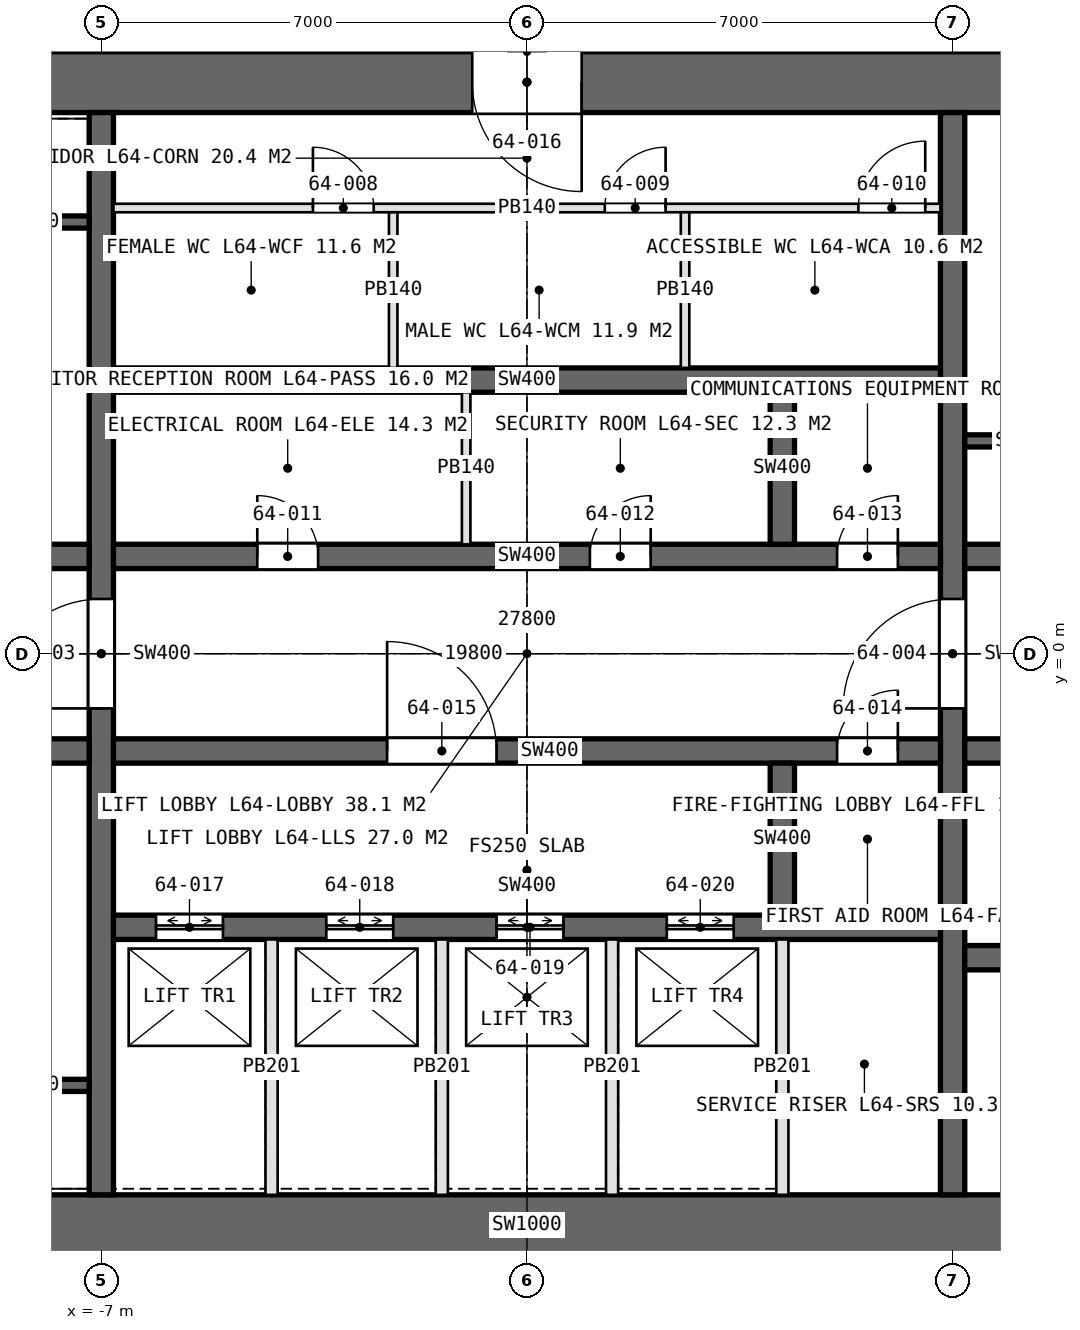
"""IFC4 building model, lengths in metres.
Left out: names, types, materials, properties, quantities, classifications, styles, units other than length and angle.
Written with IfcOpenShell. Run it as: python <this file> out.ifc"""

import sys

from ifc_helpers import new_model, si_unit, direction, frame, frame_2d, origin, place, context, subcontext, project, spatial, rectangle, extrude, element, fill, save


model = new_model("IFC4")
c1 = context("Model", 3, precision=1e-05, world=origin(), true_north=direction((0.0, 1.0)))
c2 = subcontext(c1, "Body", "Model", "MODEL_VIEW")
j1 = project(units=[si_unit("LENGTHUNIT", "METRE"), si_unit("PLANEANGLEUNIT", "RADIAN")], contexts=[c1])
p1 = place(None, origin())
s1 = spatial("IfcSite", under=j1, at=p1, CompositionType="ELEMENT")
p2 = place(p1, origin())
s2 = spatial("IfcBuilding", under=s1, at=p2, CompositionType="ELEMENT")
p3 = place(p2, frame((0.0, 0.0, 288.0)))
s3 = spatial("IfcBuildingStorey", under=s2, at=p3, CompositionType="ELEMENT", Elevation=288.0)
p4 = place(p3, frame((-13.9, -9.4, 0.0), z_axis=(0.0, 0.0, 1.0), x_axis=(1.0, 0.0, 0.0)))
e1 = element("IfcWall", 1, at=p4, inside=s3, PredefinedType="SHEAR", context=c2, shape_type="SweptSolid", body=[
    extrude(rectangle(XDim=27.8, YDim=1.0, at=frame_2d((13.9, 0.0))), origin(), (0.0, 0.0, 1.0), 4.2),
])
p5 = place(p4, frame((22.95, 0.0, 0.0)))
e2 = element("IfcOpeningElement", 2, at=p5, cuts=e1, PredefinedType="OPENING", context=c2, shape_type="SweptSolid", body=[
    extrude(rectangle(XDim=2.2, YDim=2.7, at=frame_2d((1.1, 1.35))), frame((0.0, 0.51, 0.0), z_axis=(0.0, -1.0, 0.0), x_axis=(1.0, 0.0, 0.0)), (0.0, 0.0, 1.0), 1.02),
])
p6 = place(p3, frame((13.9, 9.4, 0.0), z_axis=(0.0, 0.0, 1.0), x_axis=(-1.0, 0.0, 0.0)))
e3 = element("IfcWall", 3, at=p6, inside=s3, PredefinedType="SHEAR", context=c2, shape_type="SweptSolid", body=[
    extrude(rectangle(XDim=27.8, YDim=1.0, at=frame_2d((13.9, 0.0))), origin(), (0.0, 0.0, 1.0), 4.2),
])
p7 = place(p6, frame((23.9, 0.0, 0.0)))
e4 = element("IfcOpeningElement", 4, at=p7, cuts=e3, PredefinedType="OPENING", context=c2, shape_type="SweptSolid", body=[
    extrude(rectangle(XDim=1.0, YDim=2.4, at=frame_2d((0.5, 1.2))), frame((0.0, 0.51, 0.0), z_axis=(0.0, -1.0, 0.0), x_axis=(1.0, 0.0, 0.0)), (0.0, 0.0, 1.0), 1.02),
])
p8 = place(p6, frame((13.0, 0.0, 0.0)))
e5 = element("IfcOpeningElement", 5, at=p8, cuts=e3, PredefinedType="OPENING", context=c2, shape_type="SweptSolid", body=[
    extrude(rectangle(XDim=1.8, YDim=2.4, at=frame_2d((0.9, 1.2))), frame((0.0, 0.51, 0.0), z_axis=(0.0, -1.0, 0.0), x_axis=(1.0, 0.0, 0.0)), (0.0, 0.0, 1.0), 1.02),
])
p9 = place(p3, frame((-7.0, -8.9, 0.0), z_axis=(0.0, 0.0, 1.0), x_axis=(0.0, 1.0, 0.0)))
e6 = element("IfcWall", 6, at=p9, inside=s3, PredefinedType="SHEAR", context=c2, shape_type="SweptSolid", body=[
    extrude(rectangle(XDim=17.8, YDim=0.4, at=frame_2d((8.9, 0.0))), origin(), (0.0, 0.0, 1.0), 4.2),
])
p10 = place(p9, frame((8.0, 0.0, 0.0)))
e7 = element("IfcOpeningElement", 7, at=p10, cuts=e6, PredefinedType="OPENING", context=c2, shape_type="SweptSolid", body=[
    extrude(rectangle(XDim=1.8, YDim=2.4, at=frame_2d((0.9, 1.2))), frame((0.0, 0.21, 0.0), z_axis=(0.0, -1.0, 0.0), x_axis=(1.0, 0.0, 0.0)), (0.0, 0.0, 1.0), 0.42),
])
p11 = place(p3, frame((7.0, -8.9, 0.0), z_axis=(0.0, 0.0, 1.0), x_axis=(0.0, 1.0, 0.0)))
e8 = element("IfcWall", 8, at=p11, inside=s3, PredefinedType="SHEAR", context=c2, shape_type="SweptSolid", body=[
    extrude(rectangle(XDim=17.8, YDim=0.4, at=frame_2d((8.9, 0.0))), origin(), (0.0, 0.0, 1.0), 4.2),
])
p12 = place(p11, frame((8.0, 0.0, 0.0)))
e9 = element("IfcOpeningElement", 9, at=p12, cuts=e8, PredefinedType="OPENING", context=c2, shape_type="SweptSolid", body=[
    extrude(rectangle(XDim=1.8, YDim=2.4, at=frame_2d((0.9, 1.2))), frame((0.0, 0.21, 0.0), z_axis=(0.0, -1.0, 0.0), x_axis=(1.0, 0.0, 0.0)), (0.0, 0.0, 1.0), 0.42),
])
p13 = place(p3, frame((-6.8, 1.6, 0.0), z_axis=(0.0, 0.0, 1.0), x_axis=(1.0, 0.0, 0.0)))
e10 = element("IfcWall", 10, at=p13, inside=s3, PredefinedType="SHEAR", context=c2, shape_type="SweptSolid", body=[
    extrude(rectangle(XDim=13.6, YDim=0.4, at=frame_2d((6.8, 0.0))), origin(), (0.0, 0.0, 1.0), 4.2),
])
p14 = place(p13, frame((2.365, 0.0, 0.0)))
e11 = element("IfcOpeningElement", 11, at=p14, cuts=e10, PredefinedType="OPENING", context=c2, shape_type="SweptSolid", body=[
    extrude(rectangle(XDim=1.0, YDim=2.4, at=frame_2d((0.5, 1.2))), frame((0.0, 0.21, 0.0), z_axis=(0.0, -1.0, 0.0), x_axis=(1.0, 0.0, 0.0)), (0.0, 0.0, 1.0), 0.42),
])
p15 = place(p13, frame((7.835, 0.0, 0.0)))
e12 = element("IfcOpeningElement", 12, at=p15, cuts=e10, PredefinedType="OPENING", context=c2, shape_type="SweptSolid", body=[
    extrude(rectangle(XDim=1.0, YDim=2.4, at=frame_2d((0.5, 1.2))), frame((0.0, 0.21, 0.0), z_axis=(0.0, -1.0, 0.0), x_axis=(1.0, 0.0, 0.0)), (0.0, 0.0, 1.0), 0.42),
])
p16 = place(p13, frame((11.9, 0.0, 0.0)))
e13 = element("IfcOpeningElement", 13, at=p16, cuts=e10, PredefinedType="OPENING", context=c2, shape_type="SweptSolid", body=[
    extrude(rectangle(XDim=1.0, YDim=2.4, at=frame_2d((0.5, 1.2))), frame((0.0, 0.21, 0.0), z_axis=(0.0, -1.0, 0.0), x_axis=(1.0, 0.0, 0.0)), (0.0, 0.0, 1.0), 0.42),
])
p17 = place(p3, frame((-6.8, -1.6, 0.0), z_axis=(0.0, 0.0, 1.0), x_axis=(1.0, 0.0, 0.0)))
e14 = element("IfcWall", 14, at=p17, inside=s3, PredefinedType="SHEAR", context=c2, shape_type="SweptSolid", body=[
    extrude(rectangle(XDim=13.6, YDim=0.4, at=frame_2d((6.8, 0.0))), origin(), (0.0, 0.0, 1.0), 4.2),
])
p18 = place(p17, frame((11.9, 0.0, 0.0)))
e15 = element("IfcOpeningElement", 15, at=p18, cuts=e14, PredefinedType="OPENING", context=c2, shape_type="SweptSolid", body=[
    extrude(rectangle(XDim=1.0, YDim=2.4, at=frame_2d((0.5, 1.2))), frame((0.0, 0.21, 0.0), z_axis=(0.0, -1.0, 0.0), x_axis=(1.0, 0.0, 0.0)), (0.0, 0.0, 1.0), 0.42),
])
p19 = place(p17, frame((4.5, 0.0, 0.0)))
e16 = element("IfcOpeningElement", 16, at=p19, cuts=e14, PredefinedType="OPENING", context=c2, shape_type="SweptSolid", body=[
    extrude(rectangle(XDim=1.8, YDim=2.4, at=frame_2d((0.9, 1.2))), frame((0.0, 0.21, 0.0), z_axis=(0.0, -1.0, 0.0), x_axis=(1.0, 0.0, 0.0)), (0.0, 0.0, 1.0), 0.42),
])
p20 = place(p3, frame((-6.8, 4.5, 0.0), z_axis=(0.0, 0.0, 1.0), x_axis=(1.0, 0.0, 0.0)))
e17 = element("IfcWall", 17, at=p20, inside=s3, PredefinedType="SHEAR", context=c2, shape_type="SweptSolid", body=[
    extrude(rectangle(XDim=13.6, YDim=0.4, at=frame_2d((6.8, 0.0))), origin(), (0.0, 0.0, 1.0), 4.2),
])
p21 = place(p3, frame((-6.8, -4.5, 0.0), z_axis=(0.0, 0.0, 1.0), x_axis=(1.0, 0.0, 0.0)))
e18 = element("IfcWall", 18, at=p21, inside=s3, PredefinedType="SHEAR", context=c2, shape_type="SweptSolid", body=[
    extrude(rectangle(XDim=13.6, YDim=0.4, at=frame_2d((6.8, 0.0))), origin(), (0.0, 0.0, 1.0), 4.2),
])
p22 = place(p21, frame((0.7, 0.0, 0.0)))
e19 = element("IfcOpeningElement", 19, at=p22, cuts=e18, PredefinedType="OPENING", context=c2, shape_type="SweptSolid", body=[
    extrude(rectangle(XDim=1.1, YDim=2.4, at=frame_2d((0.55, 1.2))), frame((0.0, 0.21, 0.0), z_axis=(0.0, -1.0, 0.0), x_axis=(1.0, 0.0, 0.0)), (0.0, 0.0, 1.0), 0.42),
])
p23 = place(p21, frame((3.5, 0.0, 0.0)))
e20 = element("IfcOpeningElement", 20, at=p23, cuts=e18, PredefinedType="OPENING", context=c2, shape_type="SweptSolid", body=[
    extrude(rectangle(XDim=1.1, YDim=2.4, at=frame_2d((0.55, 1.2))), frame((0.0, 0.21, 0.0), z_axis=(0.0, -1.0, 0.0), x_axis=(1.0, 0.0, 0.0)), (0.0, 0.0, 1.0), 0.42),
])
p24 = place(p21, frame((6.3, 0.0, 0.0)))
e21 = element("IfcOpeningElement", 21, at=p24, cuts=e18, PredefinedType="OPENING", context=c2, shape_type="SweptSolid", body=[
    extrude(rectangle(XDim=1.1, YDim=2.4, at=frame_2d((0.55, 1.2))), frame((0.0, 0.21, 0.0), z_axis=(0.0, -1.0, 0.0), x_axis=(1.0, 0.0, 0.0)), (0.0, 0.0, 1.0), 0.42),
])
p25 = place(p21, frame((9.1, 0.0, 0.0)))
e22 = element("IfcOpeningElement", 22, at=p25, cuts=e18, PredefinedType="OPENING", context=c2, shape_type="SweptSolid", body=[
    extrude(rectangle(XDim=1.1, YDim=2.4, at=frame_2d((0.55, 1.2))), frame((0.0, 0.21, 0.0), z_axis=(0.0, -1.0, 0.0), x_axis=(1.0, 0.0, 0.0)), (0.0, 0.0, 1.0), 0.42),
])
for number, where, z_axis, x_axis in (
    (23, (-12.9, 1.6, 0.0), (0.0, 0.0, 1.0), (1.0, 0.0, 0.0)),
    (24, (-12.9, -1.6, 0.0), (0.0, 0.0, 1.0), (1.0, 0.0, 0.0)),
):
    element("IfcWall", number, at=place(p3, frame(where, z_axis=z_axis, x_axis=x_axis)), inside=s3, PredefinedType="SHEAR", context=c2, shape_type="SweptSolid", body=[
        extrude(rectangle(XDim=5.7, YDim=0.4, at=frame_2d((2.85, 0.0))), origin(), (0.0, 0.0, 1.0), 4.2),
    ])
p26 = place(p3, frame((7.2, 1.6, 0.0), z_axis=(0.0, 0.0, 1.0), x_axis=(1.0, 0.0, 0.0)))
e25 = element("IfcWall", 25, at=p26, inside=s3, PredefinedType="SHEAR", context=c2, shape_type="SweptSolid", body=[
    extrude(rectangle(XDim=5.7, YDim=0.4, at=frame_2d((2.85, 0.0))), origin(), (0.0, 0.0, 1.0), 4.2),
])
p27 = place(p26, frame((0.7, 0.0, 0.0)))
e26 = element("IfcOpeningElement", 26, at=p27, cuts=e25, PredefinedType="OPENING", context=c2, shape_type="SweptSolid", body=[
    extrude(rectangle(XDim=1.0, YDim=2.4, at=frame_2d((0.5, 1.2))), frame((0.0, 0.21, 0.0), z_axis=(0.0, -1.0, 0.0), x_axis=(1.0, 0.0, 0.0)), (0.0, 0.0, 1.0), 0.42),
])
p28 = place(p3, frame((7.2, -1.6, 0.0), z_axis=(0.0, 0.0, 1.0), x_axis=(1.0, 0.0, 0.0)))
e27 = element("IfcWall", 27, at=p28, inside=s3, PredefinedType="SHEAR", context=c2, shape_type="SweptSolid", body=[
    extrude(rectangle(XDim=5.7, YDim=0.4, at=frame_2d((2.85, 0.0))), origin(), (0.0, 0.0, 1.0), 4.2),
])
p29 = place(p28, frame((0.9, 0.0, 0.0)))
e28 = element("IfcOpeningElement", 28, at=p29, cuts=e27, PredefinedType="OPENING", context=c2, shape_type="SweptSolid", body=[
    extrude(rectangle(XDim=1.3, YDim=2.4, at=frame_2d((0.65, 1.2))), frame((0.0, 0.21, 0.0), z_axis=(0.0, -1.0, 0.0), x_axis=(1.0, 0.0, 0.0)), (0.0, 0.0, 1.0), 0.42),
])
p30 = place(p28, frame((3.95, 0.0, 0.0)))
e29 = element("IfcOpeningElement", 29, at=p30, cuts=e27, PredefinedType="OPENING", context=c2, shape_type="SweptSolid", body=[
    extrude(rectangle(XDim=1.3, YDim=2.4, at=frame_2d((0.65, 1.2))), frame((0.0, 0.21, 0.0), z_axis=(0.0, -1.0, 0.0), x_axis=(1.0, 0.0, 0.0)), (0.0, 0.0, 1.0), 0.42),
])
p31 = place(p3, frame((7.2, -5.0, 0.0), z_axis=(0.0, 0.0, 1.0), x_axis=(1.0, 0.0, 0.0)))
e30 = element("IfcWall", 30, at=p31, inside=s3, PredefinedType="SHEAR", context=c2, shape_type="SweptSolid", body=[
    extrude(rectangle(XDim=5.7, YDim=0.4, at=frame_2d((2.85, 0.0))), origin(), (0.0, 0.0, 1.0), 4.2),
])
for number, where, z_axis, x_axis in (
    (31, (4.2, 1.8, 0.0), (0.0, 0.0, 1.0), (0.0, 1.0, 0.0)),
    (32, (4.2, -4.3, 0.0), (0.0, 0.0, 1.0), (0.0, 1.0, 0.0)),
):
    element("IfcWall", number, at=place(p3, frame(where, z_axis=z_axis, x_axis=x_axis)), inside=s3, PredefinedType="SHEAR", context=c2, shape_type="SweptSolid", body=[
        extrude(rectangle(XDim=2.5, YDim=0.4, at=frame_2d((1.25, 0.0))), origin(), (0.0, 0.0, 1.0), 4.2),
    ])
p32 = place(p3, frame((-6.8, 7.33, 0.0), z_axis=(0.0, 0.0, 1.0), x_axis=(1.0, 0.0, 0.0)))
e33 = element("IfcWall", 33, at=p32, inside=s3, PredefinedType="PARTITIONING", context=c2, shape_type="SweptSolid", body=[
    extrude(rectangle(XDim=13.6, YDim=0.14, at=frame_2d((6.8, 0.0))), origin(), (0.0, 0.0, 1.0), 3.95),
])
p33 = place(p32, frame((3.28, 0.0, 0.0)))
e34 = element("IfcOpeningElement", 34, at=p33, cuts=e33, PredefinedType="OPENING", context=c2, shape_type="SweptSolid", body=[
    extrude(rectangle(XDim=1.0, YDim=2.4, at=frame_2d((0.5, 1.2))), frame((0.0, 0.08, 0.0), z_axis=(0.0, -1.0, 0.0), x_axis=(1.0, 0.0, 0.0)), (0.0, 0.0, 1.0), 0.16),
])
p34 = place(p32, frame((8.08, 0.0, 0.0)))
e35 = element("IfcOpeningElement", 35, at=p34, cuts=e33, PredefinedType="OPENING", context=c2, shape_type="SweptSolid", body=[
    extrude(rectangle(XDim=1.0, YDim=2.4, at=frame_2d((0.5, 1.2))), frame((0.0, 0.08, 0.0), z_axis=(0.0, -1.0, 0.0), x_axis=(1.0, 0.0, 0.0)), (0.0, 0.0, 1.0), 0.16),
])
p35 = place(p32, frame((12.25, 0.0, 0.0)))
e36 = element("IfcOpeningElement", 36, at=p35, cuts=e33, PredefinedType="OPENING", context=c2, shape_type="SweptSolid", body=[
    extrude(rectangle(XDim=1.1, YDim=2.4, at=frame_2d((0.55, 1.2))), frame((0.0, 0.08, 0.0), z_axis=(0.0, -1.0, 0.0), x_axis=(1.0, 0.0, 0.0)), (0.0, 0.0, 1.0), 0.16),
])
for number, where, z_axis, x_axis in (
    (37, (-2.2, 4.7, 0.0), (0.0, 0.0, 1.0), (0.0, 1.0, 0.0)),
    (38, (2.6, 4.7, 0.0), (0.0, 0.0, 1.0), (0.0, 1.0, 0.0)),
):
    element("IfcWall", number, at=place(p3, frame(where, z_axis=z_axis, x_axis=x_axis)), inside=s3, PredefinedType="PARTITIONING", context=c2, shape_type="SweptSolid", body=[
        extrude(rectangle(XDim=2.56, YDim=0.14, at=frame_2d((1.28, 0.0))), origin(), (0.0, 0.0, 1.0), 3.95),
    ])
p36 = place(p3, frame((-1.0, 1.8, 0.0), z_axis=(0.0, 0.0, 1.0), x_axis=(0.0, 1.0, 0.0)))
e39 = element("IfcWall", 39, at=p36, inside=s3, PredefinedType="PARTITIONING", context=c2, shape_type="SweptSolid", body=[
    extrude(rectangle(XDim=2.5, YDim=0.14, at=frame_2d((1.25, 0.0))), origin(), (0.0, 0.0, 1.0), 3.95),
])
for number, where, z_axis, x_axis in (
    (40, (-4.2, -4.7, 0.0), (0.0, 0.0, 1.0), (0.0, -1.0, 0.0)),
    (41, (-1.4, -4.7, 0.0), (0.0, 0.0, 1.0), (0.0, -1.0, 0.0)),
    (42, (1.4, -4.7, 0.0), (0.0, 0.0, 1.0), (0.0, -1.0, 0.0)),
    (43, (4.2, -4.7, 0.0), (0.0, 0.0, 1.0), (0.0, -1.0, 0.0)),
):
    element("IfcWall", number, at=place(p3, frame(where, z_axis=z_axis, x_axis=x_axis)), inside=s3, PredefinedType="PARTITIONING", context=c2, shape_type="SweptSolid", body=[
        extrude(rectangle(XDim=4.2, YDim=0.2, at=frame_2d((2.1, 0.0))), origin(), (0.0, 0.0, 1.0), 4.2),
    ])
for number, where, z_axis, x_axis in (
    (44, (-9.15, 7.1, 0.0), (0.0, 0.0, 1.0), (1.0, 0.0, 0.0)),
    (45, (-9.15, -7.1, 0.0), (0.0, 0.0, 1.0), (1.0, 0.0, 0.0)),
    (46, (9.15, 3.5, 0.0), (0.0, 0.0, 1.0), (-1.0, 0.0, 0.0)),
):
    element("IfcWall", number, at=place(p3, frame(where, z_axis=z_axis, x_axis=x_axis)), inside=s3, PredefinedType="SOLIDWALL", context=c2, shape_type="SweptSolid", body=[
        extrude(rectangle(XDim=1.95, YDim=0.2, at=frame_2d((0.975, 0.0))), origin(), (0.0, 0.0, 1.0), 4.2),
    ])
p37 = place(p10, origin())
e47 = element("IfcDoor", 47, at=p37, inside=s3, OperationType="DOUBLE_DOOR_SINGLE_SWING", PredefinedType="DOOR", context=c2, shape_type="SweptSolid", body=[
    extrude(rectangle(XDim=1.8, YDim=2.4, at=frame_2d((0.9, 1.2))), frame((0.0, 0.025, 0.0), z_axis=(0.0, -1.0, 0.0), x_axis=(1.0, 0.0, 0.0)), (0.0, 0.0, 1.0), 0.05),
])
fill(e7, e47)
p38 = place(p12, origin())
e48 = element("IfcDoor", 48, at=p38, inside=s3, OperationType="DOUBLE_DOOR_SINGLE_SWING", PredefinedType="DOOR", context=c2, shape_type="SweptSolid", body=[
    extrude(rectangle(XDim=1.8, YDim=2.4, at=frame_2d((0.9, 1.2))), frame((0.0, 0.025, 0.0), z_axis=(0.0, -1.0, 0.0), x_axis=(1.0, 0.0, 0.0)), (0.0, 0.0, 1.0), 0.05),
])
fill(e9, e48)
p39 = place(p33, origin())
e49 = element("IfcDoor", 49, at=p39, inside=s3, OperationType="SINGLE_SWING_LEFT", PredefinedType="DOOR", context=c2, shape_type="SweptSolid", body=[
    extrude(rectangle(XDim=1.0, YDim=2.4, at=frame_2d((0.5, 1.2))), frame((0.0, 0.025, 0.0), z_axis=(0.0, -1.0, 0.0), x_axis=(1.0, 0.0, 0.0)), (0.0, 0.0, 1.0), 0.05),
])
fill(e34, e49)
p40 = place(p34, origin())
e50 = element("IfcDoor", 50, at=p40, inside=s3, OperationType="SINGLE_SWING_RIGHT", PredefinedType="DOOR", context=c2, shape_type="SweptSolid", body=[
    extrude(rectangle(XDim=1.0, YDim=2.4, at=frame_2d((0.5, 1.2))), frame((0.0, 0.025, 0.0), z_axis=(0.0, -1.0, 0.0), x_axis=(1.0, 0.0, 0.0)), (0.0, 0.0, 1.0), 0.05),
])
fill(e35, e50)
p41 = place(p35, origin())
e51 = element("IfcDoor", 51, at=p41, inside=s3, OperationType="SINGLE_SWING_RIGHT", PredefinedType="DOOR", context=c2, shape_type="SweptSolid", body=[
    extrude(rectangle(XDim=1.1, YDim=2.4, at=frame_2d((0.55, 1.2))), frame((0.0, 0.025, 0.0), z_axis=(0.0, -1.0, 0.0), x_axis=(1.0, 0.0, 0.0)), (0.0, 0.0, 1.0), 0.05),
])
fill(e36, e51)
p42 = place(p14, origin())
e52 = element("IfcDoor", 52, at=p42, inside=s3, OperationType="SINGLE_SWING_LEFT", PredefinedType="DOOR", context=c2, shape_type="SweptSolid", body=[
    extrude(rectangle(XDim=1.0, YDim=2.4, at=frame_2d((0.5, 1.2))), frame((0.0, 0.025, 0.0), z_axis=(0.0, -1.0, 0.0), x_axis=(1.0, 0.0, 0.0)), (0.0, 0.0, 1.0), 0.05),
])
fill(e11, e52)
p43 = place(p15, origin())
e53 = element("IfcDoor", 53, at=p43, inside=s3, OperationType="SINGLE_SWING_RIGHT", PredefinedType="DOOR", context=c2, shape_type="SweptSolid", body=[
    extrude(rectangle(XDim=1.0, YDim=2.4, at=frame_2d((0.5, 1.2))), frame((0.0, 0.025, 0.0), z_axis=(0.0, -1.0, 0.0), x_axis=(1.0, 0.0, 0.0)), (0.0, 0.0, 1.0), 0.05),
])
fill(e12, e53)
p44 = place(p16, origin())
e54 = element("IfcDoor", 54, at=p44, inside=s3, OperationType="SINGLE_SWING_RIGHT", PredefinedType="DOOR", context=c2, shape_type="SweptSolid", body=[
    extrude(rectangle(XDim=1.0, YDim=2.4, at=frame_2d((0.5, 1.2))), frame((0.0, 0.025, 0.0), z_axis=(0.0, -1.0, 0.0), x_axis=(1.0, 0.0, 0.0)), (0.0, 0.0, 1.0), 0.05),
])
fill(e13, e54)
p45 = place(p18, origin())
e55 = element("IfcDoor", 55, at=p45, inside=s3, OperationType="SINGLE_SWING_RIGHT", PredefinedType="DOOR", context=c2, shape_type="SweptSolid", body=[
    extrude(rectangle(XDim=1.0, YDim=2.4, at=frame_2d((0.5, 1.2))), frame((0.0, 0.025, 0.0), z_axis=(0.0, -1.0, 0.0), x_axis=(1.0, 0.0, 0.0)), (0.0, 0.0, 1.0), 0.05),
])
fill(e15, e55)
p46 = place(p19, origin())
e56 = element("IfcDoor", 56, at=p46, inside=s3, OperationType="DOUBLE_DOOR_SINGLE_SWING", PredefinedType="DOOR", context=c2, shape_type="SweptSolid", body=[
    extrude(rectangle(XDim=1.8, YDim=2.4, at=frame_2d((0.9, 1.2))), frame((0.0, 0.025, 0.0), z_axis=(0.0, -1.0, 0.0), x_axis=(1.0, 0.0, 0.0)), (0.0, 0.0, 1.0), 0.05),
])
fill(e16, e56)
p47 = place(p8, origin())
e57 = element("IfcDoor", 57, at=p47, inside=s3, OperationType="DOUBLE_DOOR_SINGLE_SWING", PredefinedType="DOOR", context=c2, shape_type="SweptSolid", body=[
    extrude(rectangle(XDim=1.8, YDim=2.4, at=frame_2d((0.9, 1.2))), frame((0.0, 0.025, 0.0), z_axis=(0.0, -1.0, 0.0), x_axis=(1.0, 0.0, 0.0)), (0.0, 0.0, 1.0), 0.05),
])
fill(e5, e57)
p48 = place(p22, origin())
e58 = element("IfcDoor", 58, at=p48, inside=s3, OperationType="DOUBLE_DOOR_SLIDING", PredefinedType="DOOR", context=c2, shape_type="SweptSolid", body=[
    extrude(rectangle(XDim=1.1, YDim=2.4, at=frame_2d((0.55, 1.2))), frame((0.0, 0.025, 0.0), z_axis=(0.0, -1.0, 0.0), x_axis=(1.0, 0.0, 0.0)), (0.0, 0.0, 1.0), 0.05),
])
fill(e19, e58)
p49 = place(p23, origin())
e59 = element("IfcDoor", 59, at=p49, inside=s3, OperationType="DOUBLE_DOOR_SLIDING", PredefinedType="DOOR", context=c2, shape_type="SweptSolid", body=[
    extrude(rectangle(XDim=1.1, YDim=2.4, at=frame_2d((0.55, 1.2))), frame((0.0, 0.025, 0.0), z_axis=(0.0, -1.0, 0.0), x_axis=(1.0, 0.0, 0.0)), (0.0, 0.0, 1.0), 0.05),
])
fill(e20, e59)
p50 = place(p24, origin())
e60 = element("IfcDoor", 60, at=p50, inside=s3, OperationType="DOUBLE_DOOR_SLIDING", PredefinedType="DOOR", context=c2, shape_type="SweptSolid", body=[
    extrude(rectangle(XDim=1.1, YDim=2.4, at=frame_2d((0.55, 1.2))), frame((0.0, 0.025, 0.0), z_axis=(0.0, -1.0, 0.0), x_axis=(1.0, 0.0, 0.0)), (0.0, 0.0, 1.0), 0.05),
])
fill(e21, e60)
p51 = place(p25, origin())
e61 = element("IfcDoor", 61, at=p51, inside=s3, OperationType="DOUBLE_DOOR_SLIDING", PredefinedType="DOOR", context=c2, shape_type="SweptSolid", body=[
    extrude(rectangle(XDim=1.1, YDim=2.4, at=frame_2d((0.55, 1.2))), frame((0.0, 0.025, 0.0), z_axis=(0.0, -1.0, 0.0), x_axis=(1.0, 0.0, 0.0)), (0.0, 0.0, 1.0), 0.05),
])
fill(e22, e61)
save(model, sys.argv[1])
